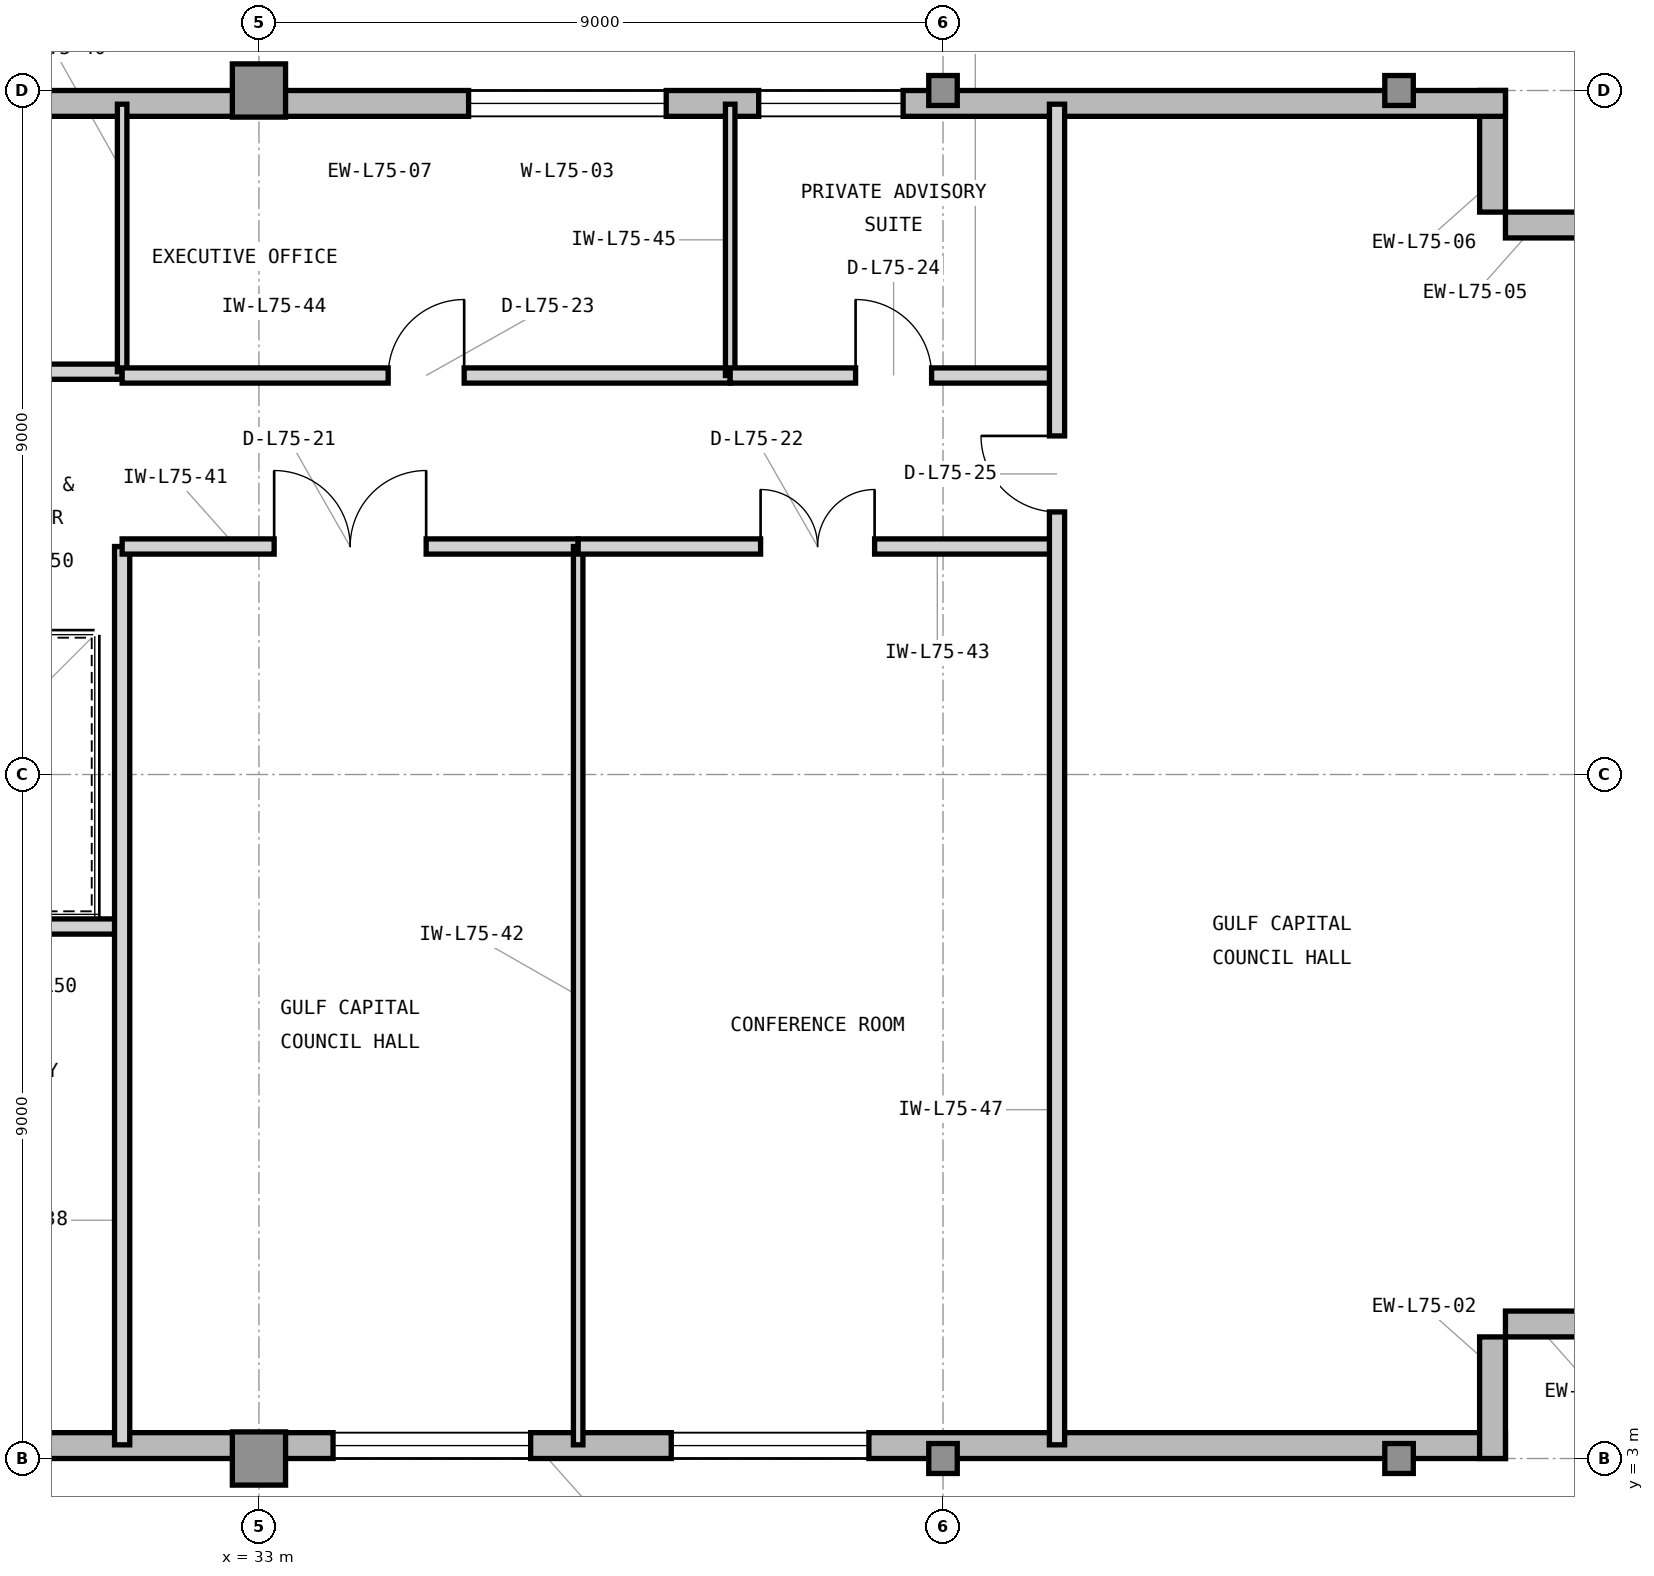
"""IFC4 building model, lengths in metres.
Left out: names, types, materials, properties, quantities, classifications, styles, units other than length and angle.
Written with IfcOpenShell. Run it as: python <this file> out.ifc"""

import sys

from ifc_helpers import new_model, si_unit, direction, frame, frame_2d, origin, origin_2d, place, context, subcontext, project, spatial, rectangle, i_section, extrude, element, fill, save


model = new_model("IFC4")
c1 = context("Model", 3, precision=1e-05, world=origin(), true_north=direction((0.0, 1.0)))
c2 = subcontext(c1, "Body", "Model", "MODEL_VIEW")
j1 = project(units=[si_unit("LENGTHUNIT", "METRE"), si_unit("PLANEANGLEUNIT", "RADIAN")], contexts=[c1])
p1 = place(None, origin())
s1 = spatial("IfcSite", under=j1, at=p1, CompositionType="ELEMENT")
p2 = place(p1, origin())
s2 = spatial("IfcBuilding", under=s1, at=p2, CompositionType="ELEMENT")
p3 = place(p2, frame((0.0, 0.0, 305.4)))
s3 = spatial("IfcBuildingStorey", under=s2, at=p3, CompositionType="ELEMENT", Elevation=305.4)
for number, where, z_axis, x_axis in (
    (1, (33.0, 3.0, 0.0), (0.0, 0.0, 1.0), (1.0, 0.0, 0.0)),
    (2, (33.0, 21.0, 0.0), (0.0, 0.0, 1.0), (1.0, 0.0, 0.0)),
):
    element("IfcColumn", number, at=place(p3, frame(where, z_axis=z_axis, x_axis=x_axis)), inside=s3, PredefinedType="COLUMN", context=c2, shape_type="SweptSolid", body=[
        extrude(rectangle(XDim=0.7, YDim=0.7, at=origin_2d()), origin(), (0.0, 0.0, 1.0), 3.9),
    ])
for number, where, z_axis, x_axis in (
    (3, (42.0, 3.0, 0.0), (0.0, 0.0, 1.0), (1.0, 0.0, 0.0)),
    (4, (42.0, 21.0, 0.0), (0.0, 0.0, 1.0), (1.0, 0.0, 0.0)),
    (5, (48.0, 3.0, 0.0), (0.0, 0.0, 1.0), (1.0, 0.0, 0.0)),
    (6, (48.0, 21.0, 0.0), (0.0, 0.0, 1.0), (1.0, 0.0, 0.0)),
):
    element("IfcColumn", number, at=place(p3, frame(where, z_axis=z_axis, x_axis=x_axis)), inside=s3, PredefinedType="COLUMN", context=c2, shape_type="SweptSolid", body=[
        extrude(i_section(OverallWidth=0.394, OverallDepth=0.375, WebThickness=0.017, FlangeThickness=0.028, FilletRadius=0.022, at=origin_2d()), origin(), (0.0, 0.0, 1.0), 3.9),
    ])
p4 = place(p3, frame((23.9, 3.17, 0.0), z_axis=(0.0, 0.0, 1.0), x_axis=(1.0, 0.0, 0.0)))
e7 = element("IfcWall", 7, at=p4, inside=s3, PredefinedType="STANDARD", context=c2, shape_type="SweptSolid", body=[
    extrude(rectangle(XDim=25.5, YDim=0.34, at=frame_2d((12.75, 0.0))), origin(), (0.0, 0.0, 1.0), 3.715),
])
p5 = place(p4, frame((0.8, 0.0, 0.8)))
e8 = element("IfcOpeningElement", 8, at=p5, cuts=e7, PredefinedType="OPENING", context=c2, shape_type="SweptSolid", body=[
    extrude(rectangle(XDim=1.9, YDim=2.35, at=frame_2d((0.95, 1.175))), frame((0.0, 0.18, 0.0), z_axis=(0.0, -1.0, 0.0), x_axis=(1.0, 0.0, 0.0)), (0.0, 0.0, 1.0), 0.36),
])
p6 = place(p4, frame((10.075, 0.0, 0.8)))
e9 = element("IfcOpeningElement", 9, at=p6, cuts=e7, PredefinedType="OPENING", context=c2, shape_type="SweptSolid", body=[
    extrude(rectangle(XDim=2.6, YDim=2.35, at=frame_2d((1.3, 1.175))), frame((0.0, 0.18, 0.0), z_axis=(0.0, -1.0, 0.0), x_axis=(1.0, 0.0, 0.0)), (0.0, 0.0, 1.0), 0.36),
])
p7 = place(p4, frame((14.525, 0.0, 0.8)))
e10 = element("IfcOpeningElement", 10, at=p7, cuts=e7, PredefinedType="OPENING", context=c2, shape_type="SweptSolid", body=[
    extrude(rectangle(XDim=2.6, YDim=2.35, at=frame_2d((1.3, 1.175))), frame((0.0, 0.18, 0.0), z_axis=(0.0, -1.0, 0.0), x_axis=(1.0, 0.0, 0.0)), (0.0, 0.0, 1.0), 0.36),
])
for number, where, z_axis, x_axis in (
    (11, (49.23, 3.0, 0.0), (0.0, 0.0, 1.0), (0.0, 1.0, 0.0)),
    (12, (49.4, 4.77, 0.0), (0.0, 0.0, 1.0), (1.0, 0.0, 0.0)),
    (13, (51.0, 19.23, 0.0), (0.0, 0.0, 1.0), (-1.0, 0.0, 0.0)),
    (14, (49.23, 19.4, 0.0), (0.0, 0.0, 1.0), (0.0, 1.0, 0.0)),
):
    element("IfcWall", number, at=place(p3, frame(where, z_axis=z_axis, x_axis=x_axis)), inside=s3, PredefinedType="STANDARD", context=c2, shape_type="SweptSolid", body=[
        extrude(rectangle(XDim=1.6, YDim=0.34, at=frame_2d((0.8, 0.0))), origin(), (0.0, 0.0, 1.0), 3.715),
    ])
p8 = place(p3, frame((49.4, 20.83, 0.0), z_axis=(0.0, 0.0, 1.0), x_axis=(-1.0, 0.0, 0.0)))
e15 = element("IfcWall", 15, at=p8, inside=s3, PredefinedType="STANDARD", context=c2, shape_type="SweptSolid", body=[
    extrude(rectangle(XDim=29.62, YDim=0.34, at=frame_2d((14.81, 0.0))), origin(), (0.0, 0.0, 1.0), 3.715),
])
p9 = place(p8, frame((11.042, 0.0, 0.8)))
e16 = element("IfcOpeningElement", 16, at=p9, cuts=e15, PredefinedType="OPENING", context=c2, shape_type="SweptSolid", body=[
    extrude(rectangle(XDim=2.6, YDim=2.35, at=frame_2d((1.3, 1.175))), frame((0.0, 0.18, 0.0), z_axis=(0.0, -1.0, 0.0), x_axis=(1.0, 0.0, 0.0)), (0.0, 0.0, 1.0), 0.36),
])
p10 = place(p8, frame((20.915, 0.0, 0.8)))
e17 = element("IfcOpeningElement", 17, at=p10, cuts=e15, PredefinedType="OPENING", context=c2, shape_type="SweptSolid", body=[
    extrude(rectangle(XDim=2.6, YDim=2.35, at=frame_2d((1.3, 1.175))), frame((0.0, 0.18, 0.0), z_axis=(0.0, -1.0, 0.0), x_axis=(1.0, 0.0, 0.0)), (0.0, 0.0, 1.0), 0.36),
])
p11 = place(p8, frame((7.925, 0.0, 0.8)))
e18 = element("IfcOpeningElement", 18, at=p11, cuts=e15, PredefinedType="OPENING", context=c2, shape_type="SweptSolid", body=[
    extrude(rectangle(XDim=1.9, YDim=2.35, at=frame_2d((0.95, 1.175))), frame((0.0, 0.18, 0.0), z_axis=(0.0, -1.0, 0.0), x_axis=(1.0, 0.0, 0.0)), (0.0, 0.0, 1.0), 0.36),
])
p12 = place(p3, frame((26.9, 10.0, 0.0), z_axis=(0.0, 0.0, 1.0), x_axis=(1.0, 0.0, 0.0)))
e19 = element("IfcWall", 19, at=p12, inside=s3, PredefinedType="PARTITIONING", context=c2, shape_type="SweptSolid", body=[
    extrude(rectangle(XDim=4.3, YDim=0.2, at=frame_2d((2.15, 0.0))), origin(), (0.0, 0.0, 1.0), 3.705),
])
p13 = place(p3, frame((31.2, 3.18, 0.0), z_axis=(0.0, 0.0, 1.0), x_axis=(0.0, 1.0, 0.0)))
e20 = element("IfcWall", 20, at=p13, inside=s3, PredefinedType="PARTITIONING", context=c2, shape_type="SweptSolid", body=[
    extrude(rectangle(XDim=11.82, YDim=0.2, at=frame_2d((5.91, 0.0))), origin(), (0.0, 0.0, 1.0), 3.705),
])
p14 = place(p3, frame((23.85, 17.3, 0.0), z_axis=(0.0, 0.0, 1.0), x_axis=(1.0, 0.0, 0.0)))
e21 = element("IfcWall", 21, at=p14, inside=s3, PredefinedType="PARTITIONING", context=c2, shape_type="SweptSolid", body=[
    extrude(rectangle(XDim=7.35, YDim=0.2, at=frame_2d((3.675, 0.0))), origin(), (0.0, 0.0, 1.0), 3.705),
])
p15 = place(p14, frame((2.8, 0.0, 0.0)))
e22 = element("IfcOpeningElement", 22, at=p15, cuts=e21, PredefinedType="OPENING", context=c2, shape_type="SweptSolid", body=[
    extrude(rectangle(XDim=1.0, YDim=2.15, at=frame_2d((0.5, 1.075))), frame((0.0, 0.11, 0.0), z_axis=(0.0, -1.0, 0.0), x_axis=(1.0, 0.0, 0.0)), (0.0, 0.0, 1.0), 0.22),
])
p16 = place(p3, frame((31.2, 17.3, 0.0), z_axis=(0.0, 0.0, 1.0), x_axis=(0.0, 1.0, 0.0)))
e23 = element("IfcWall", 23, at=p16, inside=s3, PredefinedType="PARTITIONING", context=c2, shape_type="SweptSolid", body=[
    extrude(rectangle(XDim=3.52, YDim=0.125, at=frame_2d((1.76, 0.0))), origin(), (0.0, 0.0, 1.0), 3.705),
])
p17 = place(p3, frame((31.2, 15.0, 0.0), z_axis=(0.0, 0.0, 1.0), x_axis=(1.0, 0.0, 0.0)))
e24 = element("IfcWall", 24, at=p17, inside=s3, PredefinedType="PARTITIONING", context=c2, shape_type="SweptSolid", body=[
    extrude(rectangle(XDim=6.0, YDim=0.2, at=frame_2d((3.0, 0.0))), origin(), (0.0, 0.0, 1.0), 3.354),
])
p18 = place(p17, frame((2.0, 0.0, 0.0)))
e25 = element("IfcOpeningElement", 25, at=p18, cuts=e24, PredefinedType="OPENING", context=c2, shape_type="SweptSolid", body=[
    extrude(rectangle(XDim=2.0, YDim=2.5, at=frame_2d((1.0, 1.25))), frame((0.0, 0.11, 0.0), z_axis=(0.0, -1.0, 0.0), x_axis=(1.0, 0.0, 0.0)), (0.0, 0.0, 1.0), 0.22),
])
p19 = place(p3, frame((37.2, 3.18, 0.0), z_axis=(0.0, 0.0, 1.0), x_axis=(0.0, 1.0, 0.0)))
e26 = element("IfcWall", 26, at=p19, inside=s3, PredefinedType="PARTITIONING", context=c2, shape_type="SweptSolid", body=[
    extrude(rectangle(XDim=11.82, YDim=0.125, at=frame_2d((5.91, 0.0))), origin(), (0.0, 0.0, 1.0), 3.705),
])
p20 = place(p3, frame((37.2, 15.0, 0.0), z_axis=(0.0, 0.0, 1.0), x_axis=(1.0, 0.0, 0.0)))
e27 = element("IfcWall", 27, at=p20, inside=s3, PredefinedType="PARTITIONING", context=c2, shape_type="SweptSolid", body=[
    extrude(rectangle(XDim=6.3, YDim=0.2, at=frame_2d((3.15, 0.0))), origin(), (0.0, 0.0, 1.0), 3.354),
])
p21 = place(p20, frame((2.4, 0.0, 0.0)))
e28 = element("IfcOpeningElement", 28, at=p21, cuts=e27, PredefinedType="OPENING", context=c2, shape_type="SweptSolid", body=[
    extrude(rectangle(XDim=1.5, YDim=2.3, at=frame_2d((0.75, 1.15))), frame((0.0, 0.11, 0.0), z_axis=(0.0, -1.0, 0.0), x_axis=(1.0, 0.0, 0.0)), (0.0, 0.0, 1.0), 0.22),
])
p22 = place(p3, frame((31.2, 17.25, 0.0), z_axis=(0.0, 0.0, 1.0), x_axis=(1.0, 0.0, 0.0)))
e29 = element("IfcWall", 29, at=p22, inside=s3, PredefinedType="PARTITIONING", context=c2, shape_type="SweptSolid", body=[
    extrude(rectangle(XDim=8.0, YDim=0.2, at=frame_2d((4.0, 0.0))), origin(), (0.0, 0.0, 1.0), 3.705),
])
p23 = place(p22, frame((3.5, 0.0, 0.0)))
e30 = element("IfcOpeningElement", 30, at=p23, cuts=e29, PredefinedType="OPENING", context=c2, shape_type="SweptSolid", body=[
    extrude(rectangle(XDim=1.0, YDim=2.15, at=frame_2d((0.5, 1.075))), frame((0.0, 0.11, 0.0), z_axis=(0.0, -1.0, 0.0), x_axis=(1.0, 0.0, 0.0)), (0.0, 0.0, 1.0), 0.22),
])
p24 = place(p3, frame((39.2, 17.25, 0.0), z_axis=(0.0, 0.0, 1.0), x_axis=(0.0, 1.0, 0.0)))
e31 = element("IfcWall", 31, at=p24, inside=s3, PredefinedType="PARTITIONING", context=c2, shape_type="SweptSolid", body=[
    extrude(rectangle(XDim=3.57, YDim=0.125, at=frame_2d((1.785, 0.0))), origin(), (0.0, 0.0, 1.0), 3.705),
])
p25 = place(p3, frame((39.2, 17.25, 0.0), z_axis=(0.0, 0.0, 1.0), x_axis=(1.0, 0.0, 0.0)))
e32 = element("IfcWall", 32, at=p25, inside=s3, PredefinedType="PARTITIONING", context=c2, shape_type="SweptSolid", body=[
    extrude(rectangle(XDim=4.3, YDim=0.2, at=frame_2d((2.15, 0.0))), origin(), (0.0, 0.0, 1.0), 3.705),
])
p26 = place(p25, frame((1.65, 0.0, 0.0)))
e33 = element("IfcOpeningElement", 33, at=p26, cuts=e32, PredefinedType="OPENING", context=c2, shape_type="SweptSolid", body=[
    extrude(rectangle(XDim=1.0, YDim=2.15, at=frame_2d((0.5, 1.075))), frame((0.0, 0.11, 0.0), z_axis=(0.0, -1.0, 0.0), x_axis=(1.0, 0.0, 0.0)), (0.0, 0.0, 1.0), 0.22),
])
p27 = place(p3, frame((43.5, 3.18, 0.0), z_axis=(0.0, 0.0, 1.0), x_axis=(0.0, 1.0, 0.0)))
e34 = element("IfcWall", 34, at=p27, inside=s3, PredefinedType="PARTITIONING", context=c2, shape_type="SweptSolid", body=[
    extrude(rectangle(XDim=17.64, YDim=0.2, at=frame_2d((8.82, 0.0))), origin(), (0.0, 0.0, 1.0), 3.705),
])
p28 = place(p27, frame((12.275, 0.0, 0.0)))
e35 = element("IfcOpeningElement", 35, at=p28, cuts=e34, PredefinedType="OPENING", context=c2, shape_type="SweptSolid", body=[
    extrude(rectangle(XDim=1.0, YDim=2.15, at=frame_2d((0.5, 1.075))), frame((0.0, 0.11, 0.0), z_axis=(0.0, -1.0, 0.0), x_axis=(1.0, 0.0, 0.0)), (0.0, 0.0, 1.0), 0.22),
])
p29 = place(p9, origin())
e36 = element("IfcWindow", 36, at=p29, inside=s3, PartitioningType="SINGLE_PANEL", PredefinedType="WINDOW", context=c2, shape_type="SweptSolid", body=[
    extrude(rectangle(XDim=2.6, YDim=2.35, at=frame_2d((1.3, 1.175))), frame((0.0, 0.11, 0.0), z_axis=(0.0, -1.0, 0.0), x_axis=(1.0, 0.0, 0.0)), (0.0, 0.0, 1.0), 0.06),
])
fill(e16, e36)
p30 = place(p18, origin())
e37 = element("IfcDoor", 37, at=p30, inside=s3, OperationType="DOUBLE_DOOR_SINGLE_SWING", PredefinedType="DOOR", context=c2, shape_type="SweptSolid", body=[
    extrude(rectangle(XDim=2.0, YDim=2.5, at=frame_2d((1.0, 1.25))), frame((0.0, 0.025, 0.0), z_axis=(0.0, -1.0, 0.0), x_axis=(1.0, 0.0, 0.0)), (0.0, 0.0, 1.0), 0.05),
])
fill(e25, e37)
p31 = place(p21, origin())
e38 = element("IfcDoor", 38, at=p31, inside=s3, OperationType="DOUBLE_DOOR_SINGLE_SWING", PredefinedType="DOOR", context=c2, shape_type="SweptSolid", body=[
    extrude(rectangle(XDim=1.5, YDim=2.3, at=frame_2d((0.75, 1.15))), frame((0.0, 0.025, 0.0), z_axis=(0.0, -1.0, 0.0), x_axis=(1.0, 0.0, 0.0)), (0.0, 0.0, 1.0), 0.05),
])
fill(e28, e38)
p32 = place(p23, origin())
e39 = element("IfcDoor", 39, at=p32, inside=s3, OperationType="SINGLE_SWING_RIGHT", PredefinedType="DOOR", context=c2, shape_type="SweptSolid", body=[
    extrude(rectangle(XDim=1.0, YDim=2.15, at=frame_2d((0.5, 1.075))), frame((0.0, 0.025, 0.0), z_axis=(0.0, -1.0, 0.0), x_axis=(1.0, 0.0, 0.0)), (0.0, 0.0, 1.0), 0.05),
])
fill(e30, e39)
p33 = place(p26, origin())
e40 = element("IfcDoor", 40, at=p33, inside=s3, OperationType="SINGLE_SWING_LEFT", PredefinedType="DOOR", context=c2, shape_type="SweptSolid", body=[
    extrude(rectangle(XDim=1.0, YDim=2.15, at=frame_2d((0.5, 1.075))), frame((0.0, 0.025, 0.0), z_axis=(0.0, -1.0, 0.0), x_axis=(1.0, 0.0, 0.0)), (0.0, 0.0, 1.0), 0.05),
])
fill(e33, e40)
p34 = place(p28, origin())
e41 = element("IfcDoor", 41, at=p34, inside=s3, OperationType="SINGLE_SWING_RIGHT", PredefinedType="DOOR", context=c2, shape_type="SweptSolid", body=[
    extrude(rectangle(XDim=1.0, YDim=2.15, at=frame_2d((0.5, 1.075))), frame((0.0, 0.025, 0.0), z_axis=(0.0, -1.0, 0.0), x_axis=(1.0, 0.0, 0.0)), (0.0, 0.0, 1.0), 0.05),
])
fill(e35, e41)
p35 = place(p6, origin())
e42 = element("IfcWindow", 42, at=p35, inside=s3, PartitioningType="SINGLE_PANEL", PredefinedType="WINDOW", context=c2, shape_type="SweptSolid", body=[
    extrude(rectangle(XDim=2.6, YDim=2.35, at=frame_2d((1.3, 1.175))), frame((0.0, 0.11, 0.0), z_axis=(0.0, -1.0, 0.0), x_axis=(1.0, 0.0, 0.0)), (0.0, 0.0, 1.0), 0.06),
])
fill(e9, e42)
p36 = place(p7, origin())
e43 = element("IfcWindow", 43, at=p36, inside=s3, PartitioningType="SINGLE_PANEL", PredefinedType="WINDOW", context=c2, shape_type="SweptSolid", body=[
    extrude(rectangle(XDim=2.6, YDim=2.35, at=frame_2d((1.3, 1.175))), frame((0.0, 0.11, 0.0), z_axis=(0.0, -1.0, 0.0), x_axis=(1.0, 0.0, 0.0)), (0.0, 0.0, 1.0), 0.06),
])
fill(e10, e43)
p37 = place(p11, origin())
e44 = element("IfcWindow", 44, at=p37, inside=s3, PartitioningType="SINGLE_PANEL", PredefinedType="WINDOW", context=c2, shape_type="SweptSolid", body=[
    extrude(rectangle(XDim=1.9, YDim=2.35, at=frame_2d((0.95, 1.175))), frame((0.0, 0.11, 0.0), z_axis=(0.0, -1.0, 0.0), x_axis=(1.0, 0.0, 0.0)), (0.0, 0.0, 1.0), 0.06),
])
fill(e18, e44)
save(model, sys.argv[1])
